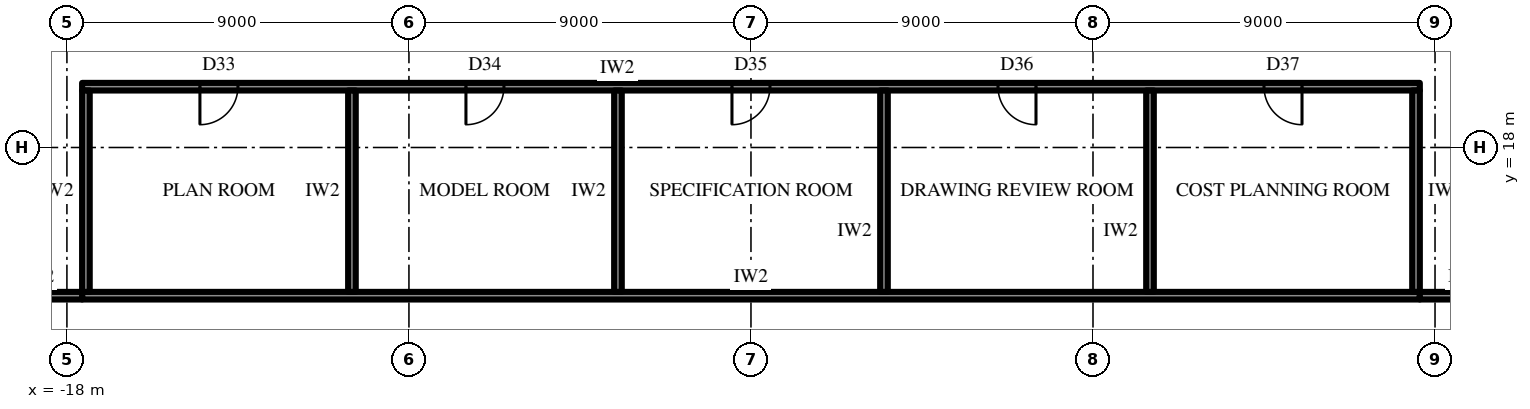
"""IFC4 building model, lengths in metres.
Left out: names, types, materials, properties, quantities, classifications, styles, units other than length and angle.
Written with IfcOpenShell. Run it as: python <this file> out.ifc"""

import sys

from ifc_helpers import new_model, si_unit, direction, frame, frame_2d, origin, place, context, subcontext, project, spatial, rectangle, extrude, element, fill, save


model = new_model("IFC4")
c1 = context("Model", 3, precision=1e-05, world=origin(), true_north=direction((0.0, 1.0)))
c2 = subcontext(c1, "Body", "Model", "MODEL_VIEW")
j1 = project(units=[si_unit("LENGTHUNIT", "METRE"), si_unit("PLANEANGLEUNIT", "RADIAN")], contexts=[c1])
p1 = place(None, origin())
s1 = spatial("IfcSite", under=j1, at=p1, CompositionType="ELEMENT")
p2 = place(p1, origin())
s2 = spatial("IfcBuilding", under=s1, at=p2, CompositionType="ELEMENT")
p3 = place(p2, frame((0.0, 0.0, 57.1)))
s3 = spatial("IfcBuildingStorey", under=s2, at=p3, CompositionType="ELEMENT", Elevation=57.1)
p4 = place(p3, frame((-17.6, 14.1, 0.0), z_axis=(0.0, 0.0, 1.0), x_axis=(1.0, 0.0, 0.0)))
e1 = element("IfcWall", 1, at=p4, inside=s3, PredefinedType="PARTITIONING", context=c2, shape_type="SweptSolid", body=[
    extrude(rectangle(XDim=35.2, YDim=0.2, at=frame_2d((17.6, 0.0))), origin(), (0.0, 0.0, 1.0), 4.0),
])
p5 = place(p3, frame((-17.6, 19.6, 0.0), z_axis=(0.0, 0.0, 1.0), x_axis=(1.0, 0.0, 0.0)))
e2 = element("IfcWall", 2, at=p5, inside=s3, PredefinedType="PARTITIONING", context=c2, shape_type="SweptSolid", body=[
    extrude(rectangle(XDim=35.2, YDim=0.2, at=frame_2d((17.6, 0.0))), origin(), (0.0, 0.0, 1.0), 4.0),
])
p6 = place(p5, frame((3.1, 0.0, 0.0)))
e3 = element("IfcOpeningElement", 3, at=p6, cuts=e2, PredefinedType="OPENING", context=c2, shape_type="SweptSolid", body=[
    extrude(rectangle(XDim=1.0, YDim=2.2, at=frame_2d((0.5, 1.1))), frame((0.0, 0.11, 0.0), z_axis=(0.0, -1.0, 0.0), x_axis=(1.0, 0.0, 0.0)), (0.0, 0.0, 1.0), 0.22),
])
p7 = place(p5, frame((10.1, 0.0, 0.0)))
e4 = element("IfcOpeningElement", 4, at=p7, cuts=e2, PredefinedType="OPENING", context=c2, shape_type="SweptSolid", body=[
    extrude(rectangle(XDim=1.0, YDim=2.2, at=frame_2d((0.5, 1.1))), frame((0.0, 0.11, 0.0), z_axis=(0.0, -1.0, 0.0), x_axis=(1.0, 0.0, 0.0)), (0.0, 0.0, 1.0), 0.22),
])
p8 = place(p5, frame((17.1, 0.0, 0.0)))
e5 = element("IfcOpeningElement", 5, at=p8, cuts=e2, PredefinedType="OPENING", context=c2, shape_type="SweptSolid", body=[
    extrude(rectangle(XDim=1.0, YDim=2.2, at=frame_2d((0.5, 1.1))), frame((0.0, 0.11, 0.0), z_axis=(0.0, -1.0, 0.0), x_axis=(1.0, 0.0, 0.0)), (0.0, 0.0, 1.0), 0.22),
])
p9 = place(p5, frame((24.1, 0.0, 0.0)))
e6 = element("IfcOpeningElement", 6, at=p9, cuts=e2, PredefinedType="OPENING", context=c2, shape_type="SweptSolid", body=[
    extrude(rectangle(XDim=1.0, YDim=2.2, at=frame_2d((0.5, 1.1))), frame((0.0, 0.11, 0.0), z_axis=(0.0, -1.0, 0.0), x_axis=(1.0, 0.0, 0.0)), (0.0, 0.0, 1.0), 0.22),
])
p10 = place(p5, frame((31.1, 0.0, 0.0)))
e7 = element("IfcOpeningElement", 7, at=p10, cuts=e2, PredefinedType="OPENING", context=c2, shape_type="SweptSolid", body=[
    extrude(rectangle(XDim=1.0, YDim=2.2, at=frame_2d((0.5, 1.1))), frame((0.0, 0.11, 0.0), z_axis=(0.0, -1.0, 0.0), x_axis=(1.0, 0.0, 0.0)), (0.0, 0.0, 1.0), 0.22),
])
for number, where, z_axis, x_axis in (
    (8, (-17.5, 14.2, 0.0), (0.0, 0.0, 1.0), (0.0, 1.0, 0.0)),
    (9, (-10.5, 14.2, 0.0), (0.0, 0.0, 1.0), (0.0, 1.0, 0.0)),
    (10, (-3.5, 14.2, 0.0), (0.0, 0.0, 1.0), (0.0, 1.0, 0.0)),
    (11, (3.5, 14.2, 0.0), (0.0, 0.0, 1.0), (0.0, 1.0, 0.0)),
    (12, (10.5, 14.2, 0.0), (0.0, 0.0, 1.0), (0.0, 1.0, 0.0)),
    (13, (17.5, 14.2, 0.0), (0.0, 0.0, 1.0), (0.0, 1.0, 0.0)),
):
    element("IfcWall", number, at=place(p3, frame(where, z_axis=z_axis, x_axis=x_axis)), inside=s3, PredefinedType="PARTITIONING", context=c2, shape_type="SweptSolid", body=[
        extrude(rectangle(XDim=5.3, YDim=0.2, at=frame_2d((2.65, 0.0))), origin(), (0.0, 0.0, 1.0), 4.0),
    ])
for number, where, z_axis, x_axis in (
    (14, (-20.0, 14.1, 0.0), (0.0, 0.0, 1.0), (1.0, 0.0, 0.0)),
    (15, (17.6, 14.1, 0.0), (0.0, 0.0, 1.0), (1.0, 0.0, 0.0)),
):
    element("IfcWall", number, at=place(p3, frame(where, z_axis=z_axis, x_axis=x_axis)), inside=s3, PredefinedType="PARTITIONING", context=c2, shape_type="SweptSolid", body=[
        extrude(rectangle(XDim=2.4, YDim=0.2, at=frame_2d((1.2, 0.0))), origin(), (0.0, 0.0, 1.0), 4.0),
    ])
p11 = place(p6, frame((1.0, 0.0, 0.0), z_axis=(0.0, 0.0, 1.0), x_axis=(-1.0, 0.0, 0.0)))
e16 = element("IfcDoor", 16, at=p11, inside=s3, OperationType="SINGLE_SWING_LEFT", PredefinedType="DOOR", context=c2, shape_type="SweptSolid", body=[
    extrude(rectangle(XDim=1.0, YDim=2.2, at=frame_2d((0.5, 1.1))), frame((0.0, 0.025, 0.0), z_axis=(0.0, -1.0, 0.0), x_axis=(1.0, 0.0, 0.0)), (0.0, 0.0, 1.0), 0.05),
])
fill(e3, e16)
p12 = place(p7, frame((1.0, 0.0, 0.0), z_axis=(0.0, 0.0, 1.0), x_axis=(-1.0, 0.0, 0.0)))
e17 = element("IfcDoor", 17, at=p12, inside=s3, OperationType="SINGLE_SWING_LEFT", PredefinedType="DOOR", context=c2, shape_type="SweptSolid", body=[
    extrude(rectangle(XDim=1.0, YDim=2.2, at=frame_2d((0.5, 1.1))), frame((0.0, 0.025, 0.0), z_axis=(0.0, -1.0, 0.0), x_axis=(1.0, 0.0, 0.0)), (0.0, 0.0, 1.0), 0.05),
])
fill(e4, e17)
p13 = place(p8, frame((1.0, 0.0, 0.0), z_axis=(0.0, 0.0, 1.0), x_axis=(-1.0, 0.0, 0.0)))
e18 = element("IfcDoor", 18, at=p13, inside=s3, OperationType="SINGLE_SWING_LEFT", PredefinedType="DOOR", context=c2, shape_type="SweptSolid", body=[
    extrude(rectangle(XDim=1.0, YDim=2.2, at=frame_2d((0.5, 1.1))), frame((0.0, 0.025, 0.0), z_axis=(0.0, -1.0, 0.0), x_axis=(1.0, 0.0, 0.0)), (0.0, 0.0, 1.0), 0.05),
])
fill(e5, e18)
p14 = place(p9, frame((1.0, 0.0, 0.0), z_axis=(0.0, 0.0, 1.0), x_axis=(-1.0, 0.0, 0.0)))
e19 = element("IfcDoor", 19, at=p14, inside=s3, OperationType="SINGLE_SWING_RIGHT", PredefinedType="DOOR", context=c2, shape_type="SweptSolid", body=[
    extrude(rectangle(XDim=1.0, YDim=2.2, at=frame_2d((0.5, 1.1))), frame((0.0, 0.025, 0.0), z_axis=(0.0, -1.0, 0.0), x_axis=(1.0, 0.0, 0.0)), (0.0, 0.0, 1.0), 0.05),
])
fill(e6, e19)
p15 = place(p10, frame((1.0, 0.0, 0.0), z_axis=(0.0, 0.0, 1.0), x_axis=(-1.0, 0.0, 0.0)))
e20 = element("IfcDoor", 20, at=p15, inside=s3, OperationType="SINGLE_SWING_RIGHT", PredefinedType="DOOR", context=c2, shape_type="SweptSolid", body=[
    extrude(rectangle(XDim=1.0, YDim=2.2, at=frame_2d((0.5, 1.1))), frame((0.0, 0.025, 0.0), z_axis=(0.0, -1.0, 0.0), x_axis=(1.0, 0.0, 0.0)), (0.0, 0.0, 1.0), 0.05),
])
fill(e7, e20)
save(model, sys.argv[1])
